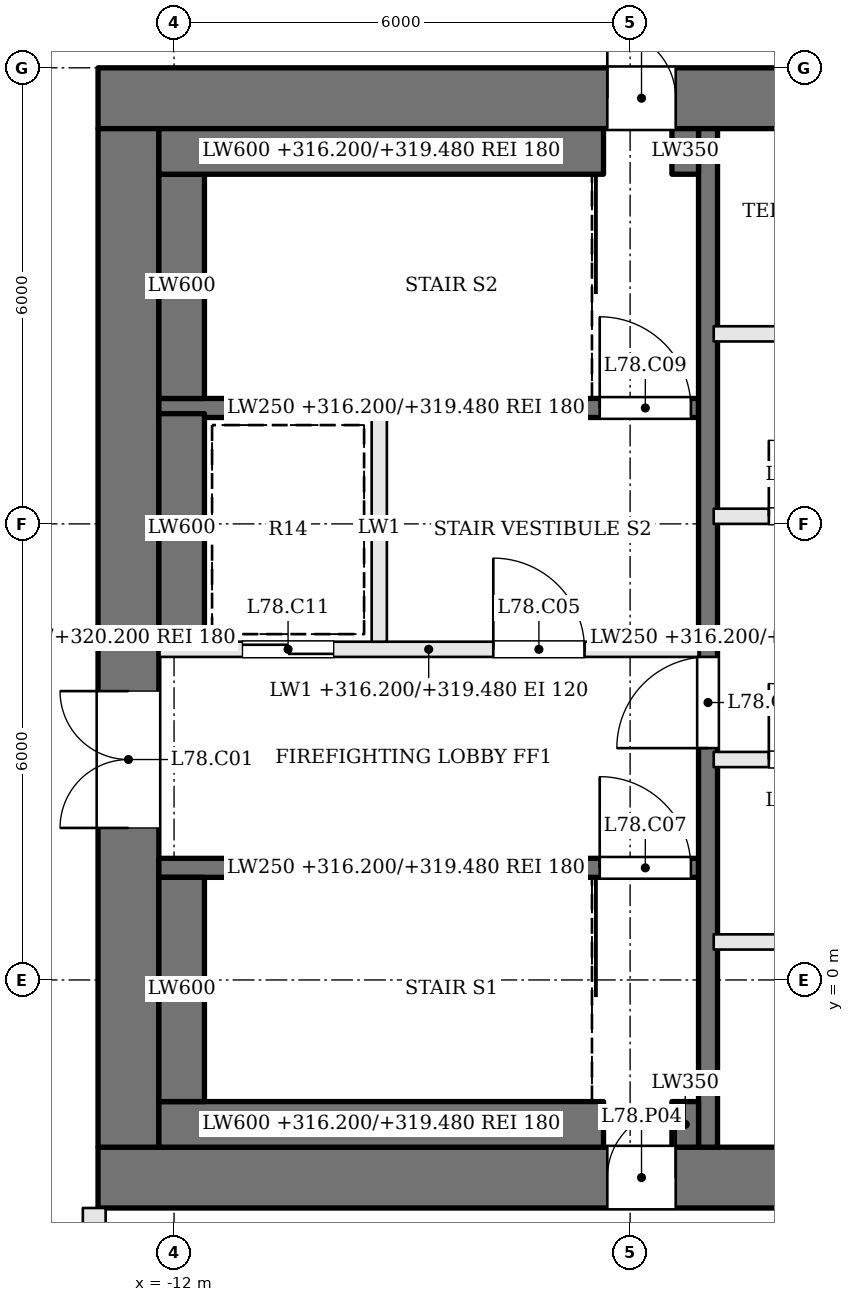
"""IFC4 building model, lengths in metres.
Left out: names, types, materials, properties, quantities, classifications, styles, units other than length and angle.
Written with IfcOpenShell. Run it as: python <this file> out.ifc"""

import sys

from ifc_helpers import new_model, si_unit, direction, frame, frame_2d, origin, place, context, subcontext, project, spatial, rectangle, extrude, element, fill, save


model = new_model("IFC4")
c1 = context("Model", 3, precision=1e-05, world=origin(), true_north=direction((0.0, 1.0)))
c2 = subcontext(c1, "Body", "Model", "MODEL_VIEW")
j1 = project(units=[si_unit("LENGTHUNIT", "METRE"), si_unit("PLANEANGLEUNIT", "RADIAN")], contexts=[c1])
p1 = place(None, origin())
s1 = spatial("IfcSite", under=j1, at=p1, CompositionType="ELEMENT")
p2 = place(p1, origin())
s2 = spatial("IfcBuilding", under=s1, at=p2, CompositionType="ELEMENT")
p3 = place(p2, frame((0.0, 0.0, 316.2)))
s3 = spatial("IfcBuildingStorey", under=s2, at=p3, CompositionType="ELEMENT", Elevation=316.2)
p4 = place(p3, frame((-13.0, 11.6, 0.0), z_axis=(0.0, 0.0, 1.0), x_axis=(1.0, 0.0, 0.0)))
e1 = element("IfcWall", 1, at=p4, inside=s3, PredefinedType="SHEAR", context=c2, shape_type="SweptSolid", body=[
    extrude(rectangle(XDim=26.0, YDim=0.8, at=frame_2d((13.0, 0.0))), origin(), (0.0, 0.0, 1.0), 4.0),
])
p5 = place(p4, frame((9.375, 0.0, 0.0)))
e2 = element("IfcOpeningElement", 2, at=p5, cuts=e1, PredefinedType="OPENING", context=c2, shape_type="SweptSolid", body=[
    extrude(rectangle(XDim=0.7, YDim=2.1, at=frame_2d((0.35, 1.05))), frame((0.0, 0.41, 0.0), z_axis=(0.0, -1.0, 0.0), x_axis=(1.0, 0.0, 0.0)), (0.0, 0.0, 1.0), 0.82),
])
p6 = place(p4, frame((12.375, 0.0, 0.0)))
e3 = element("IfcOpeningElement", 3, at=p6, cuts=e1, PredefinedType="OPENING", context=c2, shape_type="SweptSolid", body=[
    extrude(rectangle(XDim=1.2, YDim=2.1, at=frame_2d((0.6, 1.05))), frame((0.0, 0.41, 0.0), z_axis=(0.0, -1.0, 0.0), x_axis=(1.0, 0.0, 0.0)), (0.0, 0.0, 1.0), 0.82),
])
p7 = place(p4, frame((15.9, 0.0, 0.0)))
e4 = element("IfcOpeningElement", 4, at=p7, cuts=e1, PredefinedType="OPENING", context=c2, shape_type="SweptSolid", body=[
    extrude(rectangle(XDim=0.7, YDim=2.1, at=frame_2d((0.35, 1.05))), frame((0.0, 0.41, 0.0), z_axis=(0.0, -1.0, 0.0), x_axis=(1.0, 0.0, 0.0)), (0.0, 0.0, 1.0), 0.82),
])
p8 = place(p4, frame((6.7, 0.0, 0.0)))
e5 = element("IfcOpeningElement", 5, at=p8, cuts=e1, PredefinedType="OPENING", context=c2, shape_type="SweptSolid", body=[
    extrude(rectangle(XDim=0.9, YDim=2.1, at=frame_2d((0.45, 1.05))), frame((0.0, 0.41, 0.0), z_axis=(0.0, -1.0, 0.0), x_axis=(1.0, 0.0, 0.0)), (0.0, 0.0, 1.0), 0.82),
])
p9 = place(p3, frame((-13.0, -2.6, 0.0), z_axis=(0.0, 0.0, 1.0), x_axis=(1.0, 0.0, 0.0)))
e6 = element("IfcWall", 6, at=p9, inside=s3, PredefinedType="SHEAR", context=c2, shape_type="SweptSolid", body=[
    extrude(rectangle(XDim=26.0, YDim=0.8, at=frame_2d((13.0, 0.0))), origin(), (0.0, 0.0, 1.0), 4.0),
])
p10 = place(p9, frame((9.125, 0.0, 0.0)))
e7 = element("IfcOpeningElement", 7, at=p10, cuts=e6, PredefinedType="OPENING", context=c2, shape_type="SweptSolid", body=[
    extrude(rectangle(XDim=1.2, YDim=2.1, at=frame_2d((0.6, 1.05))), frame((0.0, 0.41, 0.0), z_axis=(0.0, -1.0, 0.0), x_axis=(1.0, 0.0, 0.0)), (0.0, 0.0, 1.0), 0.82),
])
p11 = place(p9, frame((12.375, 0.0, 0.0)))
e8 = element("IfcOpeningElement", 8, at=p11, cuts=e6, PredefinedType="OPENING", context=c2, shape_type="SweptSolid", body=[
    extrude(rectangle(XDim=1.2, YDim=2.1, at=frame_2d((0.6, 1.05))), frame((0.0, 0.41, 0.0), z_axis=(0.0, -1.0, 0.0), x_axis=(1.0, 0.0, 0.0)), (0.0, 0.0, 1.0), 0.82),
])
p12 = place(p9, frame((15.9, 0.0, 0.0)))
e9 = element("IfcOpeningElement", 9, at=p12, cuts=e6, PredefinedType="OPENING", context=c2, shape_type="SweptSolid", body=[
    extrude(rectangle(XDim=0.7, YDim=2.1, at=frame_2d((0.35, 1.05))), frame((0.0, 0.41, 0.0), z_axis=(0.0, -1.0, 0.0), x_axis=(1.0, 0.0, 0.0)), (0.0, 0.0, 1.0), 0.82),
])
p13 = place(p9, frame((6.7, 0.0, 0.0)))
e10 = element("IfcOpeningElement", 10, at=p13, cuts=e6, PredefinedType="OPENING", context=c2, shape_type="SweptSolid", body=[
    extrude(rectangle(XDim=0.9, YDim=2.1, at=frame_2d((0.45, 1.05))), frame((0.0, 0.41, 0.0), z_axis=(0.0, -1.0, 0.0), x_axis=(1.0, 0.0, 0.0)), (0.0, 0.0, 1.0), 0.82),
])
p14 = place(p3, frame((-12.6, -2.2, 0.0), z_axis=(0.0, 0.0, 1.0), x_axis=(0.0, 1.0, 0.0)))
e11 = element("IfcWall", 11, at=p14, inside=s3, PredefinedType="SHEAR", context=c2, shape_type="SweptSolid", body=[
    extrude(rectangle(XDim=13.4, YDim=0.8, at=frame_2d((6.7, 0.0))), origin(), (0.0, 0.0, 1.0), 4.0),
])
p15 = place(p14, frame((4.2, 0.0, 0.0)))
e12 = element("IfcOpeningElement", 12, at=p15, cuts=e11, PredefinedType="OPENING", context=c2, shape_type="SweptSolid", body=[
    extrude(rectangle(XDim=1.8, YDim=2.1, at=frame_2d((0.9, 1.05))), frame((0.0, 0.41, 0.0), z_axis=(0.0, -1.0, 0.0), x_axis=(1.0, 0.0, 0.0)), (0.0, 0.0, 1.0), 0.82),
])
p16 = place(p3, frame((-12.2, 1.475, 0.0), z_axis=(0.0, 0.0, 1.0), x_axis=(1.0, 0.0, 0.0)))
e13 = element("IfcWall", 13, at=p16, inside=s3, PredefinedType="SOLIDWALL", context=c2, shape_type="SweptSolid", body=[
    extrude(rectangle(XDim=7.1, YDim=0.25, at=frame_2d((3.55, 0.0))), origin(), (0.0, 0.0, 1.0), 3.28),
])
p17 = place(p16, frame((5.8, 0.0, 0.0)))
e14 = element("IfcOpeningElement", 14, at=p17, cuts=e13, PredefinedType="OPENING", context=c2, shape_type="SweptSolid", body=[
    extrude(rectangle(XDim=1.2, YDim=2.1, at=frame_2d((0.6, 1.05))), frame((0.0, 0.135, 0.0), z_axis=(0.0, -1.0, 0.0), x_axis=(1.0, 0.0, 0.0)), (0.0, 0.0, 1.0), 0.27),
])
p18 = place(p3, frame((-12.2, 4.35, 0.0), z_axis=(0.0, 0.0, 1.0), x_axis=(1.0, 0.0, 0.0)))
e15 = element("IfcWall", 15, at=p18, inside=s3, PredefinedType="SOLIDWALL", context=c2, shape_type="SweptSolid", body=[
    extrude(rectangle(XDim=7.1, YDim=0.2, at=frame_2d((3.55, 0.0))), origin(), (0.0, 0.0, 1.0), 3.28),
])
p19 = place(p18, frame((4.4, 0.0, 0.0)))
e16 = element("IfcOpeningElement", 16, at=p19, cuts=e15, PredefinedType="OPENING", context=c2, shape_type="SweptSolid", body=[
    extrude(rectangle(XDim=1.2, YDim=2.1, at=frame_2d((0.6, 1.05))), frame((0.0, 0.11, 0.0), z_axis=(0.0, -1.0, 0.0), x_axis=(1.0, 0.0, 0.0)), (0.0, 0.0, 1.0), 0.22),
])
p20 = place(p18, frame((1.1, 0.0, 0.0)))
e17 = element("IfcOpeningElement", 17, at=p20, cuts=e15, PredefinedType="OPENING", context=c2, shape_type="SweptSolid", body=[
    extrude(rectangle(XDim=1.2, YDim=2.1, at=frame_2d((0.6, 1.05))), frame((0.0, 0.11, 0.0), z_axis=(0.0, -1.0, 0.0), x_axis=(1.0, 0.0, 0.0)), (0.0, 0.0, 1.0), 0.22),
])
p21 = place(p3, frame((-12.2, 7.525, 0.0), z_axis=(0.0, 0.0, 1.0), x_axis=(1.0, 0.0, 0.0)))
e18 = element("IfcWall", 18, at=p21, inside=s3, PredefinedType="SOLIDWALL", context=c2, shape_type="SweptSolid", body=[
    extrude(rectangle(XDim=7.1, YDim=0.25, at=frame_2d((3.55, 0.0))), origin(), (0.0, 0.0, 1.0), 3.28),
])
p22 = place(p21, frame((5.8, 0.0, 0.0)))
e19 = element("IfcOpeningElement", 19, at=p22, cuts=e18, PredefinedType="OPENING", context=c2, shape_type="SweptSolid", body=[
    extrude(rectangle(XDim=1.2, YDim=2.1, at=frame_2d((0.6, 1.05))), frame((0.0, 0.135, 0.0), z_axis=(0.0, -1.0, 0.0), x_axis=(1.0, 0.0, 0.0)), (0.0, 0.0, 1.0), 0.27),
])
p23 = place(p3, frame((-9.3, 4.45, 0.0), z_axis=(0.0, 0.0, 1.0), x_axis=(0.0, 1.0, 0.0)))
e20 = element("IfcWall", 20, at=p23, inside=s3, PredefinedType="SOLIDWALL", context=c2, shape_type="SweptSolid", body=[
    extrude(rectangle(XDim=3.0, YDim=0.2, at=frame_2d((1.5, 0.0))), origin(), (0.0, 0.0, 1.0), 3.28),
])
p24 = place(p3, frame((-4.975, -2.2, 0.0), z_axis=(0.0, 0.0, 1.0), x_axis=(0.0, 1.0, 0.0)))
e21 = element("IfcWall", 21, at=p24, inside=s3, PredefinedType="SOLIDWALL", context=c2, shape_type="SweptSolid", body=[
    extrude(rectangle(XDim=13.4, YDim=0.25, at=frame_2d((6.7, 0.0))), origin(), (0.0, 0.0, 1.0), 3.28),
])
p25 = place(p24, frame((5.25, 0.0, 0.0)))
e22 = element("IfcOpeningElement", 22, at=p25, cuts=e21, PredefinedType="OPENING", context=c2, shape_type="SweptSolid", body=[
    extrude(rectangle(XDim=1.2, YDim=2.1, at=frame_2d((0.6, 1.05))), frame((0.0, 0.135, 0.0), z_axis=(0.0, -1.0, 0.0), x_axis=(1.0, 0.0, 0.0)), (0.0, 0.0, 1.0), 0.27),
])
p26 = place(p3, frame((-12.2, -1.9, 0.0), z_axis=(0.0, 0.0, 1.0), x_axis=(1.0, 0.0, 0.0)))
e23 = element("IfcWall", 23, at=p26, inside=s3, PredefinedType="SOLIDWALL", context=c2, shape_type="SweptSolid", body=[
    extrude(rectangle(XDim=5.85, YDim=0.6, at=frame_2d((2.925, 0.0))), origin(), (0.0, 0.0, 1.0), 3.28),
])
p27 = place(p3, frame((-5.275, -2.2, 0.0), z_axis=(0.0, 0.0, 1.0), x_axis=(0.0, 1.0, 0.0)))
e24 = element("IfcWall", 24, at=p27, inside=s3, PredefinedType="SOLIDWALL", context=c2, shape_type="SweptSolid", body=[
    extrude(rectangle(XDim=0.6, YDim=0.35, at=frame_2d((0.3, 0.0))), origin(), (0.0, 0.0, 1.0), 3.28),
])
p28 = place(p3, frame((-11.9, -1.6, 0.0), z_axis=(0.0, 0.0, 1.0), x_axis=(0.0, 1.0, 0.0)))
e25 = element("IfcWall", 25, at=p28, inside=s3, PredefinedType="SOLIDWALL", context=c2, shape_type="SweptSolid", body=[
    extrude(rectangle(XDim=2.95, YDim=0.6, at=frame_2d((1.475, 0.0))), origin(), (0.0, 0.0, 1.0), 3.28),
])
p29 = place(p3, frame((-11.9, 4.45, 0.0), z_axis=(0.0, 0.0, 1.0), x_axis=(0.0, 1.0, 0.0)))
e26 = element("IfcWall", 26, at=p29, inside=s3, PredefinedType="SOLIDWALL", context=c2, shape_type="SweptSolid", body=[
    extrude(rectangle(XDim=3.0, YDim=0.6, at=frame_2d((1.5, 0.0))), origin(), (0.0, 0.0, 1.0), 3.28),
])
p30 = place(p3, frame((-11.9, 7.65, 0.0), z_axis=(0.0, 0.0, 1.0), x_axis=(0.0, 1.0, 0.0)))
e27 = element("IfcWall", 27, at=p30, inside=s3, PredefinedType="SOLIDWALL", context=c2, shape_type="SweptSolid", body=[
    extrude(rectangle(XDim=2.95, YDim=0.6, at=frame_2d((1.475, 0.0))), origin(), (0.0, 0.0, 1.0), 3.28),
])
p31 = place(p3, frame((-12.2, 10.9, 0.0), z_axis=(0.0, 0.0, 1.0), x_axis=(1.0, 0.0, 0.0)))
e28 = element("IfcWall", 28, at=p31, inside=s3, PredefinedType="SOLIDWALL", context=c2, shape_type="SweptSolid", body=[
    extrude(rectangle(XDim=5.85, YDim=0.6, at=frame_2d((2.925, 0.0))), origin(), (0.0, 0.0, 1.0), 3.28),
])
p32 = place(p3, frame((-5.275, 10.6, 0.0), z_axis=(0.0, 0.0, 1.0), x_axis=(0.0, 1.0, 0.0)))
e29 = element("IfcWall", 29, at=p32, inside=s3, PredefinedType="SOLIDWALL", context=c2, shape_type="SweptSolid", body=[
    extrude(rectangle(XDim=0.6, YDim=0.35, at=frame_2d((0.3, 0.0))), origin(), (0.0, 0.0, 1.0), 3.28),
])
p33 = place(p3, frame((-4.9, 0.5, 0.0), z_axis=(0.0, 0.0, 1.0), x_axis=(1.0, 0.0, 0.0)))
e30 = element("IfcWall", 30, at=p33, inside=s3, PredefinedType="SOLIDWALL", context=c2, shape_type="SweptSolid", body=[
    extrude(rectangle(XDim=9.8, YDim=0.2, at=frame_2d((4.9, 0.0))), origin(), (0.0, 0.0, 1.0), 3.28),
])
p34 = place(p3, frame((-4.9, 2.9, 0.0), z_axis=(0.0, 0.0, 1.0), x_axis=(1.0, 0.0, 0.0)))
e31 = element("IfcWall", 31, at=p34, inside=s3, PredefinedType="SOLIDWALL", context=c2, shape_type="SweptSolid", body=[
    extrude(rectangle(XDim=9.8, YDim=0.2, at=frame_2d((4.9, 0.0))), origin(), (0.0, 0.0, 1.0), 3.28),
])
p35 = place(p34, frame((0.725, 0.0, 0.0)))
e32 = element("IfcOpeningElement", 32, at=p35, cuts=e31, PredefinedType="OPENING", context=c2, shape_type="SweptSolid", body=[
    extrude(rectangle(XDim=1.0, YDim=2.1, at=frame_2d((0.5, 1.05))), frame((0.0, 0.11, 0.0), z_axis=(0.0, -1.0, 0.0), x_axis=(1.0, 0.0, 0.0)), (0.0, 0.0, 1.0), 0.22),
])
p36 = place(p34, frame((3.175, 0.0, 0.0)))
e33 = element("IfcOpeningElement", 33, at=p36, cuts=e31, PredefinedType="OPENING", context=c2, shape_type="SweptSolid", body=[
    extrude(rectangle(XDim=1.0, YDim=2.1, at=frame_2d((0.5, 1.05))), frame((0.0, 0.11, 0.0), z_axis=(0.0, -1.0, 0.0), x_axis=(1.0, 0.0, 0.0)), (0.0, 0.0, 1.0), 0.22),
])
p37 = place(p34, frame((5.525, 0.0, 0.0)))
e34 = element("IfcOpeningElement", 34, at=p37, cuts=e31, PredefinedType="OPENING", context=c2, shape_type="SweptSolid", body=[
    extrude(rectangle(XDim=1.2, YDim=2.1, at=frame_2d((0.6, 1.05))), frame((0.0, 0.11, 0.0), z_axis=(0.0, -1.0, 0.0), x_axis=(1.0, 0.0, 0.0)), (0.0, 0.0, 1.0), 0.22),
])
p38 = place(p34, frame((7.975, 0.0, 0.0)))
e35 = element("IfcOpeningElement", 35, at=p38, cuts=e31, PredefinedType="OPENING", context=c2, shape_type="SweptSolid", body=[
    extrude(rectangle(XDim=1.2, YDim=2.1, at=frame_2d((0.6, 1.05))), frame((0.0, 0.11, 0.0), z_axis=(0.0, -1.0, 0.0), x_axis=(1.0, 0.0, 0.0)), (0.0, 0.0, 1.0), 0.22),
])
p39 = place(p3, frame((-4.9, 6.1, 0.0), z_axis=(0.0, 0.0, 1.0), x_axis=(1.0, 0.0, 0.0)))
e36 = element("IfcWall", 36, at=p39, inside=s3, PredefinedType="SOLIDWALL", context=c2, shape_type="SweptSolid", body=[
    extrude(rectangle(XDim=9.8, YDim=0.2, at=frame_2d((4.9, 0.0))), origin(), (0.0, 0.0, 1.0), 3.28),
])
p40 = place(p39, frame((0.725, 0.0, 0.0)))
e37 = element("IfcOpeningElement", 37, at=p40, cuts=e36, PredefinedType="OPENING", context=c2, shape_type="SweptSolid", body=[
    extrude(rectangle(XDim=1.0, YDim=2.1, at=frame_2d((0.5, 1.05))), frame((0.0, 0.11, 0.0), z_axis=(0.0, -1.0, 0.0), x_axis=(1.0, 0.0, 0.0)), (0.0, 0.0, 1.0), 0.22),
])
p41 = place(p39, frame((3.175, 0.0, 0.0)))
e38 = element("IfcOpeningElement", 38, at=p41, cuts=e36, PredefinedType="OPENING", context=c2, shape_type="SweptSolid", body=[
    extrude(rectangle(XDim=1.0, YDim=2.1, at=frame_2d((0.5, 1.05))), frame((0.0, 0.11, 0.0), z_axis=(0.0, -1.0, 0.0), x_axis=(1.0, 0.0, 0.0)), (0.0, 0.0, 1.0), 0.22),
])
p42 = place(p39, frame((5.625, 0.0, 0.0)))
e39 = element("IfcOpeningElement", 39, at=p42, cuts=e36, PredefinedType="OPENING", context=c2, shape_type="SweptSolid", body=[
    extrude(rectangle(XDim=1.0, YDim=2.1, at=frame_2d((0.5, 1.05))), frame((0.0, 0.11, 0.0), z_axis=(0.0, -1.0, 0.0), x_axis=(1.0, 0.0, 0.0)), (0.0, 0.0, 1.0), 0.22),
])
p43 = place(p39, frame((8.075, 0.0, 0.0)))
e40 = element("IfcOpeningElement", 40, at=p43, cuts=e36, PredefinedType="OPENING", context=c2, shape_type="SweptSolid", body=[
    extrude(rectangle(XDim=1.0, YDim=2.1, at=frame_2d((0.5, 1.05))), frame((0.0, 0.11, 0.0), z_axis=(0.0, -1.0, 0.0), x_axis=(1.0, 0.0, 0.0)), (0.0, 0.0, 1.0), 0.22),
])
p44 = place(p3, frame((-4.9, 8.5, 0.0), z_axis=(0.0, 0.0, 1.0), x_axis=(1.0, 0.0, 0.0)))
e41 = element("IfcWall", 41, at=p44, inside=s3, PredefinedType="SOLIDWALL", context=c2, shape_type="SweptSolid", body=[
    extrude(rectangle(XDim=9.8, YDim=0.2, at=frame_2d((4.9, 0.0))), origin(), (0.0, 0.0, 1.0), 3.28),
])
p45 = place(p3, frame((-13.05, -8.0, 0.0), z_axis=(0.0, 0.0, 1.0), x_axis=(0.0, 1.0, 0.0)))
e42 = element("IfcWall", 42, at=p45, inside=s3, PredefinedType="SOLIDWALL", context=c2, shape_type="SweptSolid", body=[
    extrude(rectangle(XDim=5.0, YDim=0.3, at=frame_2d((2.5, 0.0))), origin(), (0.0, 0.0, 1.0), 3.484),
])
p46 = place(p15, origin())
e43 = element("IfcDoor", 43, at=p46, inside=s3, OperationType="DOUBLE_DOOR_SINGLE_SWING", PredefinedType="DOOR", context=c2, shape_type="SweptSolid", body=[
    extrude(rectangle(XDim=1.8, YDim=2.1, at=frame_2d((0.9, 1.05))), frame((0.0, 0.025, 0.0), z_axis=(0.0, -1.0, 0.0), x_axis=(1.0, 0.0, 0.0)), (0.0, 0.0, 1.0), 0.05),
])
fill(e12, e43)
p47 = place(p25, origin())
e44 = element("IfcDoor", 44, at=p47, inside=s3, OperationType="SINGLE_SWING_LEFT", PredefinedType="DOOR", context=c2, shape_type="SweptSolid", body=[
    extrude(rectangle(XDim=1.2, YDim=2.1, at=frame_2d((0.6, 1.05))), frame((0.0, 0.025, 0.0), z_axis=(0.0, -1.0, 0.0), x_axis=(1.0, 0.0, 0.0)), (0.0, 0.0, 1.0), 0.05),
])
fill(e22, e44)
p48 = place(p19, origin())
e45 = element("IfcDoor", 45, at=p48, inside=s3, OperationType="SINGLE_SWING_LEFT", PredefinedType="DOOR", context=c2, shape_type="SweptSolid", body=[
    extrude(rectangle(XDim=1.2, YDim=2.1, at=frame_2d((0.6, 1.05))), frame((0.0, 0.025, 0.0), z_axis=(0.0, -1.0, 0.0), x_axis=(1.0, 0.0, 0.0)), (0.0, 0.0, 1.0), 0.05),
])
fill(e16, e45)
p49 = place(p17, origin())
e46 = element("IfcDoor", 46, at=p49, inside=s3, OperationType="SINGLE_SWING_LEFT", PredefinedType="DOOR", context=c2, shape_type="SweptSolid", body=[
    extrude(rectangle(XDim=1.2, YDim=2.1, at=frame_2d((0.6, 1.05))), frame((0.0, 0.025, 0.0), z_axis=(0.0, -1.0, 0.0), x_axis=(1.0, 0.0, 0.0)), (0.0, 0.0, 1.0), 0.05),
])
fill(e14, e46)
p50 = place(p22, origin())
e47 = element("IfcDoor", 47, at=p50, inside=s3, OperationType="SINGLE_SWING_LEFT", PredefinedType="DOOR", context=c2, shape_type="SweptSolid", body=[
    extrude(rectangle(XDim=1.2, YDim=2.1, at=frame_2d((0.6, 1.05))), frame((0.0, 0.025, 0.0), z_axis=(0.0, -1.0, 0.0), x_axis=(1.0, 0.0, 0.0)), (0.0, 0.0, 1.0), 0.05),
])
fill(e19, e47)
p51 = place(p20, origin())
e48 = element("IfcDoor", 48, at=p51, inside=s3, OperationType="SLIDING_TO_RIGHT", PredefinedType="DOOR", context=c2, shape_type="SweptSolid", body=[
    extrude(rectangle(XDim=1.2, YDim=2.1, at=frame_2d((0.6, 1.05))), frame((0.0, 0.025, 0.0), z_axis=(0.0, -1.0, 0.0), x_axis=(1.0, 0.0, 0.0)), (0.0, 0.0, 1.0), 0.05),
])
fill(e17, e48)
p52 = place(p35, origin())
e49 = element("IfcDoor", 49, at=p52, inside=s3, OperationType="SINGLE_SWING_LEFT", PredefinedType="DOOR", context=c2, shape_type="SweptSolid", body=[
    extrude(rectangle(XDim=1.0, YDim=2.1, at=frame_2d((0.5, 1.05))), frame((0.0, 0.025, 0.0), z_axis=(0.0, -1.0, 0.0), x_axis=(1.0, 0.0, 0.0)), (0.0, 0.0, 1.0), 0.05),
])
fill(e32, e49)
p53 = place(p40, origin())
e50 = element("IfcDoor", 50, at=p53, inside=s3, OperationType="SINGLE_SWING_LEFT", PredefinedType="DOOR", context=c2, shape_type="SweptSolid", body=[
    extrude(rectangle(XDim=1.0, YDim=2.1, at=frame_2d((0.5, 1.05))), frame((0.0, 0.025, 0.0), z_axis=(0.0, -1.0, 0.0), x_axis=(1.0, 0.0, 0.0)), (0.0, 0.0, 1.0), 0.05),
])
fill(e37, e50)
p54 = place(p13, origin())
e51 = element("IfcDoor", 51, at=p54, inside=s3, OperationType="SINGLE_SWING_RIGHT", PredefinedType="DOOR", context=c2, shape_type="SweptSolid", body=[
    extrude(rectangle(XDim=0.9, YDim=2.1, at=frame_2d((0.45, 1.05))), frame((0.0, 0.025, 0.0), z_axis=(0.0, -1.0, 0.0), x_axis=(1.0, 0.0, 0.0)), (0.0, 0.0, 1.0), 0.05),
])
fill(e10, e51)
p55 = place(p8, origin())
e52 = element("IfcDoor", 52, at=p55, inside=s3, OperationType="SINGLE_SWING_LEFT", PredefinedType="DOOR", context=c2, shape_type="SweptSolid", body=[
    extrude(rectangle(XDim=0.9, YDim=2.1, at=frame_2d((0.45, 1.05))), frame((0.0, 0.025, 0.0), z_axis=(0.0, -1.0, 0.0), x_axis=(1.0, 0.0, 0.0)), (0.0, 0.0, 1.0), 0.05),
])
fill(e5, e52)
save(model, sys.argv[1])
